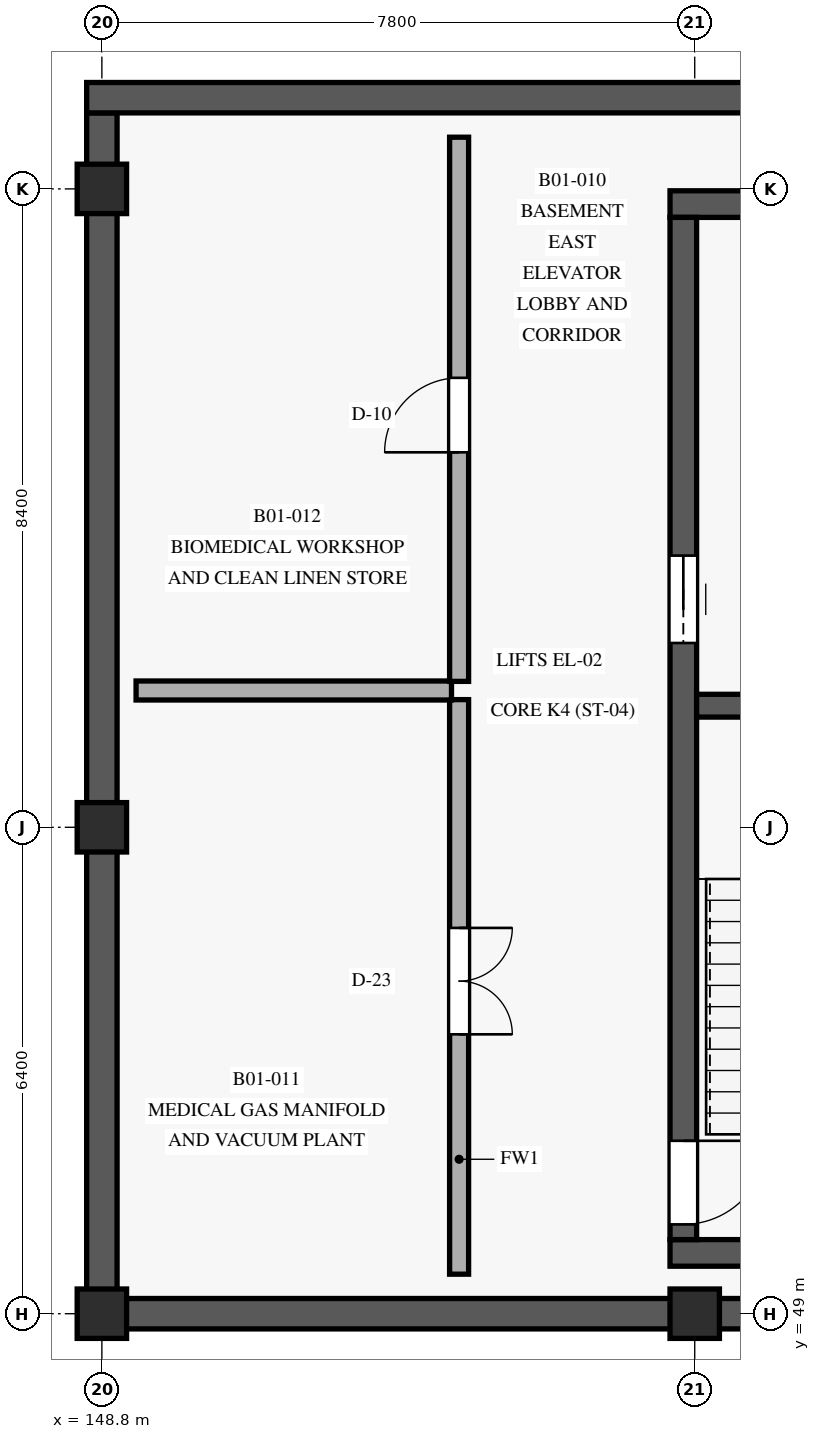
"""IFC4 building model, lengths in metres.
Left out: names, types, materials, properties, quantities, classifications, styles, units other than length and angle.
Written with IfcOpenShell. Run it as: python <this file> out.ifc"""

import sys

from ifc_helpers import new_model, si_unit, direction, frame, frame_2d, origin, origin_with_axes, origin_2d, place, context, subcontext, project, spatial, rectangle, extrude, element, fill, save


model = new_model("IFC4")
c1 = context("Model", 3, precision=1e-05, world=origin(), true_north=direction((0.0, 1.0)))
c2 = subcontext(c1, "Body", "Model", "MODEL_VIEW")
j1 = project(units=[si_unit("LENGTHUNIT", "METRE"), si_unit("PLANEANGLEUNIT", "RADIAN")], contexts=[c1])
p1 = place(None, origin())
s1 = spatial("IfcSite", under=j1, at=p1, CompositionType="ELEMENT")
p2 = place(p1, origin())
s2 = spatial("IfcBuilding", under=s1, at=p2, CompositionType="ELEMENT")
p3 = place(p2, frame((0.0, 0.0, -4.5)))
s3 = spatial("IfcBuildingStorey", under=s2, at=p3, CompositionType="ELEMENT", Elevation=-4.5)
for number, where, z_axis, x_axis in (
    (1, (148.8, 49.0, 0.0), (0.0, 0.0, 1.0), (1.0, 0.0, 0.0)),
    (2, (148.8, 55.4, 0.0), (0.0, 0.0, 1.0), (1.0, 0.0, 0.0)),
    (3, (148.8, 63.8, 0.0), (0.0, 0.0, 1.0), (1.0, 0.0, 0.0)),
    (4, (156.6, 49.0, 0.0), (0.0, 0.0, 1.0), (1.0, 0.0, 0.0)),
):
    element("IfcColumn", number, at=place(p3, frame(where, z_axis=z_axis, x_axis=x_axis)), inside=s3, PredefinedType="COLUMN", context=c2, shape_type="SweptSolid", body=[
        extrude(rectangle(XDim=0.65, YDim=0.65, at=origin_2d()), origin(), (0.0, 0.0, 1.0), 4.5),
    ])
p4 = place(p3, frame((148.6, 49.0, 0.0), z_axis=(0.0, 0.0, 1.0), x_axis=(1.0, 0.0, 0.0)))
e5 = element("IfcWall", 5, at=p4, inside=s3, PredefinedType="SHEAR", context=c2, shape_type="SweptSolid", body=[
    extrude(rectangle(XDim=15.0, YDim=0.4, at=frame_2d((7.5, 0.0))), origin(), (0.0, 0.0, 1.0), 4.15),
])
p5 = place(p3, frame((148.8, 64.8, 0.0), z_axis=(0.0, 0.0, 1.0), x_axis=(0.0, -1.0, 0.0)))
e6 = element("IfcWall", 6, at=p5, inside=s3, PredefinedType="SHEAR", context=c2, shape_type="SweptSolid", body=[
    extrude(rectangle(XDim=15.6, YDim=0.4, at=frame_2d((7.8, 0.0))), origin(), (0.0, 0.0, 1.0), 4.15),
])
p6 = place(p3, frame((163.6, 65.0, 0.0), z_axis=(0.0, 0.0, 1.0), x_axis=(-1.0, 0.0, 0.0)))
e7 = element("IfcWall", 7, at=p6, inside=s3, PredefinedType="SHEAR", context=c2, shape_type="SweptSolid", body=[
    extrude(rectangle(XDim=15.0, YDim=0.4, at=frame_2d((7.5, 0.0))), origin(), (0.0, 0.0, 1.0), 4.15),
])
for number, where, z_axis, x_axis in (
    (8, (156.275, 49.8, 0.0), (0.0, 0.0, 1.0), (1.0, 0.0, 0.0)),
    (9, (160.625, 63.6, 0.0), (0.0, 0.0, 1.0), (-1.0, 0.0, 0.0)),
):
    element("IfcWall", number, at=place(p3, frame(where, z_axis=z_axis, x_axis=x_axis)), inside=s3, PredefinedType="SHEAR", context=c2, shape_type="SweptSolid", body=[
        extrude(rectangle(XDim=4.35, YDim=0.35, at=frame_2d((2.175, 0.0))), origin(), (0.0, 0.0, 1.0), 4.2),
    ])
p7 = place(p3, frame((156.45, 63.425, 0.0), z_axis=(0.0, 0.0, 1.0), x_axis=(0.0, -1.0, 0.0)))
e10 = element("IfcWall", 10, at=p7, inside=s3, PredefinedType="SHEAR", context=c2, shape_type="SweptSolid", body=[
    extrude(rectangle(XDim=13.45, YDim=0.35, at=frame_2d((6.725, 0.0))), origin(), (0.0, 0.0, 1.0), 4.2),
])
p8 = place(p7, frame((12.15, 0.0, 0.0)))
e11 = element("IfcOpeningElement", 11, at=p8, cuts=e10, PredefinedType="OPENING", context=c2, shape_type="SweptSolid", body=[
    extrude(rectangle(XDim=1.1, YDim=2.2, at=frame_2d((0.55, 1.1))), frame((0.0, 0.185, 0.0), z_axis=(0.0, -1.0, 0.0), x_axis=(1.0, 0.0, 0.0)), (0.0, 0.0, 1.0), 0.37),
])
p9 = place(p7, frame((4.45, 0.0, 0.0)))
e12 = element("IfcOpeningElement", 12, at=p9, cuts=e10, PredefinedType="OPENING", context=c2, shape_type="SweptSolid", body=[
    extrude(rectangle(XDim=1.15, YDim=2.2, at=frame_2d((0.575, 1.1))), frame((0.0, 0.185, 0.0), z_axis=(0.0, -1.0, 0.0), x_axis=(1.0, 0.0, 0.0)), (0.0, 0.0, 1.0), 0.37),
])
p10 = place(p3, frame((156.625, 57.0, 0.0), z_axis=(0.0, 0.0, 1.0), x_axis=(1.0, 0.0, 0.0)))
e13 = element("IfcWall", 13, at=p10, inside=s3, PredefinedType="SHEAR", context=c2, shape_type="SweptSolid", body=[
    extrude(rectangle(XDim=3.65, YDim=0.3, at=frame_2d((1.825, 0.0))), origin(), (0.0, 0.0, 1.0), 4.2),
])
p11 = place(p3, frame((153.5, 49.52, 0.0), z_axis=(0.0, 0.0, 1.0), x_axis=(0.0, 1.0, 0.0)))
e14 = element("IfcWall", 14, at=p11, inside=s3, PredefinedType="SOLIDWALL", context=c2, shape_type="SweptSolid", body=[
    extrude(rectangle(XDim=7.56, YDim=0.25, at=frame_2d((3.78, 0.0))), origin(), (0.0, 0.0, 1.0), 3.595),
])
p12 = place(p11, frame((3.156, 0.0, 0.0)))
e15 = element("IfcOpeningElement", 15, at=p12, cuts=e14, PredefinedType="OPENING", context=c2, shape_type="SweptSolid", body=[
    extrude(rectangle(XDim=1.4, YDim=2.35, at=frame_2d((0.7, 1.175))), frame((0.0, 0.135, 0.0), z_axis=(0.0, -1.0, 0.0), x_axis=(1.0, 0.0, 0.0)), (0.0, 0.0, 1.0), 0.27),
])
p13 = place(p3, frame((149.25, 57.2, 0.0), z_axis=(0.0, 0.0, 1.0), x_axis=(1.0, 0.0, 0.0)))
e16 = element("IfcWall", 16, at=p13, inside=s3, PredefinedType="SOLIDWALL", context=c2, shape_type="SweptSolid", body=[
    extrude(rectangle(XDim=4.15, YDim=0.25, at=frame_2d((2.075, 0.0))), origin(), (0.0, 0.0, 1.0), 4.195),
])
p14 = place(p3, frame((153.5, 57.32, 0.0), z_axis=(0.0, 0.0, 1.0), x_axis=(0.0, 1.0, 0.0)))
e17 = element("IfcWall", 17, at=p14, inside=s3, PredefinedType="SOLIDWALL", context=c2, shape_type="SweptSolid", body=[
    extrude(rectangle(XDim=7.16, YDim=0.25, at=frame_2d((3.58, 0.0))), origin(), (0.0, 0.0, 1.0), 3.595),
])
p15 = place(p14, frame((3.014, 0.0, 0.0)))
e18 = element("IfcOpeningElement", 18, at=p15, cuts=e17, PredefinedType="OPENING", context=c2, shape_type="SweptSolid", body=[
    extrude(rectangle(XDim=0.98, YDim=2.12, at=frame_2d((0.49, 1.06))), frame((0.0, 0.135, 0.0), z_axis=(0.0, -1.0, 0.0), x_axis=(1.0, 0.0, 0.0)), (0.0, 0.0, 1.0), 0.27),
])
p16 = place(p8, origin_with_axes())
e19 = element("IfcDoor", 19, at=p16, inside=s3, OperationType="SINGLE_SWING_LEFT", PredefinedType="DOOR", context=c2, shape_type="SweptSolid", body=[
    extrude(rectangle(XDim=1.1, YDim=2.2, at=frame_2d((0.55, 1.1))), frame((0.0, 0.025, 0.0), z_axis=(0.0, -1.0, 0.0), x_axis=(1.0, 0.0, 0.0)), (0.0, 0.0, 1.0), 0.05),
])
fill(e11, e19)
p17 = place(p9, origin_with_axes())
e20 = element("IfcDoor", 20, at=p17, inside=s3, OperationType="SLIDING_TO_LEFT", PredefinedType="DOOR", context=c2, shape_type="SweptSolid", body=[
    extrude(rectangle(XDim=1.15, YDim=2.2, at=frame_2d((0.575, 1.1))), frame((0.0, 0.025, 0.0), z_axis=(0.0, -1.0, 0.0), x_axis=(1.0, 0.0, 0.0)), (0.0, 0.0, 1.0), 0.05),
])
fill(e12, e20)
p18 = place(p12, frame((1.4, 0.0, 0.0), z_axis=(0.0, 0.0, 1.0), x_axis=(-1.0, 0.0, 0.0)))
e21 = element("IfcDoor", 21, at=p18, inside=s3, OperationType="DOUBLE_DOOR_SINGLE_SWING", PredefinedType="DOOR", context=c2, shape_type="SweptSolid", body=[
    extrude(rectangle(XDim=1.4, YDim=2.35, at=frame_2d((0.7, 1.175))), frame((0.0, 0.025, 0.0), z_axis=(0.0, -1.0, 0.0), x_axis=(1.0, 0.0, 0.0)), (0.0, 0.0, 1.0), 0.05),
])
fill(e15, e21)
p19 = place(p15, frame((0.98, 0.0, 0.0), z_axis=(0.0, 0.0, 1.0), x_axis=(-1.0, 0.0, 0.0)))
e22 = element("IfcDoor", 22, at=p19, inside=s3, OperationType="SINGLE_SWING_RIGHT", PredefinedType="DOOR", context=c2, shape_type="SweptSolid", body=[
    extrude(rectangle(XDim=0.98, YDim=2.12, at=frame_2d((0.49, 1.06))), frame((0.0, 0.025, 0.0), z_axis=(0.0, -1.0, 0.0), x_axis=(1.0, 0.0, 0.0)), (0.0, 0.0, 1.0), 0.05),
])
fill(e18, e22)
save(model, sys.argv[1])
